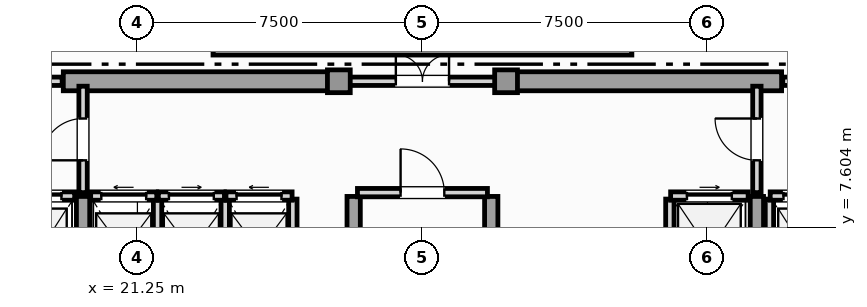
"""IFC4 building model, lengths in metres.
Left out: names, types, materials, properties, quantities, classifications, styles, units other than length and angle.
Written with IfcOpenShell. Run it as: python <this file> out.ifc"""

import sys

from ifc_helpers import new_model, si_unit, direction, frame, frame_2d, origin, origin_2d, place, context, subcontext, project, spatial, rectangle, extrude, element, fill, save


model = new_model("IFC4")
c1 = context("Model", 3, precision=1e-05, world=origin(), true_north=direction((0.0, 1.0)))
c2 = subcontext(c1, "Body", "Model", "MODEL_VIEW")
j1 = project(units=[si_unit("LENGTHUNIT", "METRE"), si_unit("PLANEANGLEUNIT", "RADIAN")], contexts=[c1])
p1 = place(None, origin())
s1 = spatial("IfcSite", under=j1, at=p1, CompositionType="ELEMENT")
p2 = place(p1, origin())
s2 = spatial("IfcBuilding", under=s1, at=p2, CompositionType="ELEMENT")
p3 = place(p2, frame((0.0, 0.0, 341.35)))
s3 = spatial("IfcBuildingStorey", under=s2, at=p3, CompositionType="ELEMENT", Elevation=341.35)
for number, where, z_axis, x_axis in (
    (1, (19.3, 11.45, 0.0), (0.0, 0.0, 1.0), (1.0, 0.0, 0.0)),
    (2, (30.9, 11.45, 0.0), (0.0, 0.0, 1.0), (1.0, 0.0, 0.0)),
):
    element("IfcWall", number, at=place(p3, frame(where, z_axis=z_axis, x_axis=x_axis)), inside=s3, PredefinedType="SHEAR", context=c2, shape_type="SweptSolid", body=[
        extrude(rectangle(XDim=7.3, YDim=0.5, at=frame_2d((3.65, 0.0))), origin(), (0.0, 0.0, 1.0), 3.63),
    ])
for number, where, z_axis, x_axis in (
    (3, (19.82, 0.92, 0.0), (0.0, 0.0, 1.0), (0.0, 1.0, 0.0)),
    (4, (26.94, 0.92, 0.0), (0.0, 0.0, 1.0), (0.0, 1.0, 0.0)),
    (5, (30.56, 0.92, 0.0), (0.0, 0.0, 1.0), (0.0, 1.0, 0.0)),
    (6, (37.55, 0.92, 0.0), (0.0, 0.0, 1.0), (0.0, 1.0, 0.0)),
):
    element("IfcWall", number, at=place(p3, frame(where, z_axis=z_axis, x_axis=x_axis)), inside=s3, PredefinedType="SHEAR", context=c2, shape_type="SweptSolid", body=[
        extrude(rectangle(XDim=7.5, YDim=0.35, at=frame_2d((3.75, 0.0))), origin(), (0.0, 0.0, 1.0), 3.63),
    ])
for number, where, z_axis, x_axis in (
    (7, (26.55, 11.45, 0.0), (0.0, 0.0, 1.0), (1.0, 0.0, 0.0)),
    (8, (30.95, 11.45, 0.0), (0.0, 0.0, 1.0), (1.0, 0.0, 0.0)),
):
    element("IfcColumn", number, at=place(p3, frame(where, z_axis=z_axis, x_axis=x_axis)), inside=s3, PredefinedType="COLUMN", context=c2, shape_type="SweptSolid", body=[
        extrude(rectangle(XDim=0.6, YDim=0.6, at=origin_2d()), origin(), (0.0, 0.0, 1.0), 3.85),
    ])
p4 = place(p3, frame((34.26, 12.27, 0.0), z_axis=(0.0, 0.0, 1.0), x_axis=(-1.0, 0.0, 0.0)))
e9 = element("IfcWall", 9, at=p4, inside=s3, PredefinedType="SOLIDWALL", context=c2, shape_type="SweptSolid", body=[
    extrude(rectangle(XDim=11.02, YDim=0.26, at=frame_2d((5.51, 0.0))), origin(), (0.0, 0.0, 1.0), 3.63),
])
p5 = place(p3, frame((17.78, 8.43, 0.0), z_axis=(0.0, 0.0, 1.0), x_axis=(1.0, 0.0, 0.0)))
e10 = element("IfcWall", 10, at=p5, inside=s3, PredefinedType="SOLIDWALL", context=c2, shape_type="SweptSolid", body=[
    extrude(rectangle(XDim=1.82, YDim=0.22, at=frame_2d((0.91, 0.0))), origin(), (0.0, 0.0, 1.0), 3.63),
])
p6 = place(p5, frame((0.35, 0.0, 0.0)))
e11 = element("IfcOpeningElement", 11, at=p6, cuts=e10, PredefinedType="OPENING", context=c2, shape_type="SweptSolid", body=[
    extrude(rectangle(XDim=1.12, YDim=2.25, at=frame_2d((0.56, 1.125))), frame((0.0, 0.12, 0.0), z_axis=(0.0, -1.0, 0.0), x_axis=(1.0, 0.0, 0.0)), (0.0, 0.0, 1.0), 0.24),
])
p7 = place(p3, frame((37.88, 5.65, 0.0), z_axis=(0.0, 0.0, 1.0), x_axis=(0.0, 1.0, 0.0)))
e12 = element("IfcWall", 12, at=p7, inside=s3, PredefinedType="SOLIDWALL", context=c2, shape_type="SweptSolid", body=[
    extrude(rectangle(XDim=2.7, YDim=0.22, at=frame_2d((1.35, 0.0))), origin(), (0.0, 0.0, 1.0), 3.63),
])
p8 = place(p3, frame((37.9, 8.43, 0.0), z_axis=(0.0, 0.0, 1.0), x_axis=(1.0, 0.0, 0.0)))
e13 = element("IfcWall", 13, at=p8, inside=s3, PredefinedType="SOLIDWALL", context=c2, shape_type="SweptSolid", body=[
    extrude(rectangle(XDim=1.82, YDim=0.22, at=frame_2d((0.91, 0.0))), origin(), (0.0, 0.0, 1.0), 3.63),
])
p9 = place(p8, frame((0.35, 0.0, 0.0)))
e14 = element("IfcOpeningElement", 14, at=p9, cuts=e13, PredefinedType="OPENING", context=c2, shape_type="SweptSolid", body=[
    extrude(rectangle(XDim=1.12, YDim=2.25, at=frame_2d((0.56, 1.125))), frame((0.0, 0.12, 0.0), z_axis=(0.0, -1.0, 0.0), x_axis=(1.0, 0.0, 0.0)), (0.0, 0.0, 1.0), 0.24),
])
p10 = place(p3, frame((35.26, 5.65, 0.0), z_axis=(0.0, 0.0, 1.0), x_axis=(0.0, 1.0, 0.0)))
e15 = element("IfcWall", 15, at=p10, inside=s3, PredefinedType="SOLIDWALL", context=c2, shape_type="SweptSolid", body=[
    extrude(rectangle(XDim=2.7, YDim=0.22, at=frame_2d((1.35, 0.0))), origin(), (0.0, 0.0, 1.0), 3.63),
])
p11 = place(p3, frame((35.28, 8.43, 0.0), z_axis=(0.0, 0.0, 1.0), x_axis=(1.0, 0.0, 0.0)))
e16 = element("IfcWall", 16, at=p11, inside=s3, PredefinedType="SOLIDWALL", context=c2, shape_type="SweptSolid", body=[
    extrude(rectangle(XDim=2.04, YDim=0.22, at=frame_2d((1.02, 0.0))), origin(), (0.0, 0.0, 1.0), 3.63),
])
p12 = place(p11, frame((0.43, 0.0, 0.0)))
e17 = element("IfcOpeningElement", 17, at=p12, cuts=e16, PredefinedType="OPENING", context=c2, shape_type="SweptSolid", body=[
    extrude(rectangle(XDim=1.18, YDim=2.2, at=frame_2d((0.59, 1.1))), frame((0.0, 0.12, 0.0), z_axis=(0.0, -1.0, 0.0), x_axis=(1.0, 0.0, 0.0)), (0.0, 0.0, 1.0), 0.24),
])
p13 = place(p3, frame((21.78, 5.65, 0.0), z_axis=(0.0, 0.0, 1.0), x_axis=(0.0, 1.0, 0.0)))
e18 = element("IfcWall", 18, at=p13, inside=s3, PredefinedType="SOLIDWALL", context=c2, shape_type="SweptSolid", body=[
    extrude(rectangle(XDim=2.7, YDim=0.22, at=frame_2d((1.35, 0.0))), origin(), (0.0, 0.0, 1.0), 3.63),
])
p14 = place(p3, frame((20.02, 8.43, 0.0), z_axis=(0.0, 0.0, 1.0), x_axis=(1.0, 0.0, 0.0)))
e19 = element("IfcWall", 19, at=p14, inside=s3, PredefinedType="SOLIDWALL", context=c2, shape_type="SweptSolid", body=[
    extrude(rectangle(XDim=1.74, YDim=0.22, at=frame_2d((0.87, 0.0))), origin(), (0.0, 0.0, 1.0), 3.63),
])
p15 = place(p14, frame((0.28, 0.0, 0.0)))
e20 = element("IfcOpeningElement", 20, at=p15, cuts=e19, PredefinedType="OPENING", context=c2, shape_type="SweptSolid", body=[
    extrude(rectangle(XDim=1.18, YDim=2.2, at=frame_2d((0.59, 1.1))), frame((0.0, 0.12, 0.0), z_axis=(0.0, -1.0, 0.0), x_axis=(1.0, 0.0, 0.0)), (0.0, 0.0, 1.0), 0.24),
])
p16 = place(p3, frame((23.56, 5.65, 0.0), z_axis=(0.0, 0.0, 1.0), x_axis=(0.0, 1.0, 0.0)))
e21 = element("IfcWall", 21, at=p16, inside=s3, PredefinedType="SOLIDWALL", context=c2, shape_type="SweptSolid", body=[
    extrude(rectangle(XDim=2.7, YDim=0.22, at=frame_2d((1.35, 0.0))), origin(), (0.0, 0.0, 1.0), 3.63),
])
p17 = place(p3, frame((21.8, 8.43, 0.0), z_axis=(0.0, 0.0, 1.0), x_axis=(1.0, 0.0, 0.0)))
e22 = element("IfcWall", 22, at=p17, inside=s3, PredefinedType="SOLIDWALL", context=c2, shape_type="SweptSolid", body=[
    extrude(rectangle(XDim=1.74, YDim=0.22, at=frame_2d((0.87, 0.0))), origin(), (0.0, 0.0, 1.0), 3.63),
])
p18 = place(p17, frame((0.28, 0.0, 0.0)))
e23 = element("IfcOpeningElement", 23, at=p18, cuts=e22, PredefinedType="OPENING", context=c2, shape_type="SweptSolid", body=[
    extrude(rectangle(XDim=1.18, YDim=2.2, at=frame_2d((0.59, 1.1))), frame((0.0, 0.12, 0.0), z_axis=(0.0, -1.0, 0.0), x_axis=(1.0, 0.0, 0.0)), (0.0, 0.0, 1.0), 0.24),
])
p19 = place(p3, frame((25.34, 5.65, 0.0), z_axis=(0.0, 0.0, 1.0), x_axis=(0.0, 1.0, 0.0)))
e24 = element("IfcWall", 24, at=p19, inside=s3, PredefinedType="SOLIDWALL", context=c2, shape_type="SweptSolid", body=[
    extrude(rectangle(XDim=2.7, YDim=0.22, at=frame_2d((1.35, 0.0))), origin(), (0.0, 0.0, 1.0), 3.63),
])
p20 = place(p3, frame((23.58, 8.43, 0.0), z_axis=(0.0, 0.0, 1.0), x_axis=(1.0, 0.0, 0.0)))
e25 = element("IfcWall", 25, at=p20, inside=s3, PredefinedType="SOLIDWALL", context=c2, shape_type="SweptSolid", body=[
    extrude(rectangle(XDim=1.74, YDim=0.22, at=frame_2d((0.87, 0.0))), origin(), (0.0, 0.0, 1.0), 3.63),
])
p21 = place(p20, frame((0.28, 0.0, 0.0)))
e26 = element("IfcOpeningElement", 26, at=p21, cuts=e25, PredefinedType="OPENING", context=c2, shape_type="SweptSolid", body=[
    extrude(rectangle(XDim=1.18, YDim=2.2, at=frame_2d((0.59, 1.1))), frame((0.0, 0.12, 0.0), z_axis=(0.0, -1.0, 0.0), x_axis=(1.0, 0.0, 0.0)), (0.0, 0.0, 1.0), 0.24),
])
p22 = place(p3, frame((27.04, 8.52, 0.0), z_axis=(0.0, 0.0, 1.0), x_axis=(1.0, 0.0, 0.0)))
e27 = element("IfcWall", 27, at=p22, inside=s3, PredefinedType="SOLIDWALL", context=c2, shape_type="SweptSolid", body=[
    extrude(rectangle(XDim=3.42, YDim=0.22, at=frame_2d((1.71, 0.0))), origin(), (0.0, 0.0, 1.0), 3.63),
])
p23 = place(p22, frame((1.135, 0.0, 0.0)))
e28 = element("IfcOpeningElement", 28, at=p23, cuts=e27, PredefinedType="OPENING", context=c2, shape_type="SweptSolid", body=[
    extrude(rectangle(XDim=1.15, YDim=2.2, at=frame_2d((0.575, 1.1))), frame((0.0, 0.12, 0.0), z_axis=(0.0, -1.0, 0.0), x_axis=(1.0, 0.0, 0.0)), (0.0, 0.0, 1.0), 0.24),
])
p24 = place(p3, frame((19.82, 8.52, 0.0), z_axis=(0.0, 0.0, 1.0), x_axis=(0.0, 1.0, 0.0)))
e29 = element("IfcWall", 29, at=p24, inside=s3, PredefinedType="SOLIDWALL", context=c2, shape_type="SweptSolid", body=[
    extrude(rectangle(XDim=2.8, YDim=0.22, at=frame_2d((1.4, 0.0))), origin(), (0.0, 0.0, 1.0), 3.085),
])
p25 = place(p24, frame((0.85, 0.0, 0.0)))
e30 = element("IfcOpeningElement", 30, at=p25, cuts=e29, PredefinedType="OPENING", context=c2, shape_type="SweptSolid", body=[
    extrude(rectangle(XDim=1.1, YDim=2.2, at=frame_2d((0.55, 1.1))), frame((0.0, 0.12, 0.0), z_axis=(0.0, -1.0, 0.0), x_axis=(1.0, 0.0, 0.0)), (0.0, 0.0, 1.0), 0.24),
])
p26 = place(p3, frame((37.55, 8.52, 0.0), z_axis=(0.0, 0.0, 1.0), x_axis=(0.0, 1.0, 0.0)))
e31 = element("IfcWall", 31, at=p26, inside=s3, PredefinedType="SOLIDWALL", context=c2, shape_type="SweptSolid", body=[
    extrude(rectangle(XDim=2.8, YDim=0.22, at=frame_2d((1.4, 0.0))), origin(), (0.0, 0.0, 1.0), 3.085),
])
p27 = place(p26, frame((0.85, 0.0, 0.0)))
e32 = element("IfcOpeningElement", 32, at=p27, cuts=e31, PredefinedType="OPENING", context=c2, shape_type="SweptSolid", body=[
    extrude(rectangle(XDim=1.1, YDim=2.2, at=frame_2d((0.55, 1.1))), frame((0.0, 0.12, 0.0), z_axis=(0.0, -1.0, 0.0), x_axis=(1.0, 0.0, 0.0)), (0.0, 0.0, 1.0), 0.24),
])
p28 = place(p3, frame((16.23, 11.45, 0.0), z_axis=(0.0, 0.0, 1.0), x_axis=(1.0, 0.0, 0.0)))
e33 = element("IfcWall", 33, at=p28, inside=s3, PredefinedType="SOLIDWALL", context=c2, shape_type="SweptSolid", body=[
    extrude(rectangle(XDim=3.04, YDim=0.22, at=frame_2d((1.52, 0.0))), origin(), (0.0, 0.0, 1.0), 3.63),
])
p29 = place(p28, frame((0.97, 0.0, 0.0)))
e34 = element("IfcOpeningElement", 34, at=p29, cuts=e33, PredefinedType="OPENING", context=c2, shape_type="SweptSolid", body=[
    extrude(rectangle(XDim=1.1, YDim=2.2, at=frame_2d((0.55, 1.1))), frame((0.0, 0.12, 0.0), z_axis=(0.0, -1.0, 0.0), x_axis=(1.0, 0.0, 0.0)), (0.0, 0.0, 1.0), 0.24),
])
p30 = place(p3, frame((26.63, 11.45, 0.0), z_axis=(0.0, 0.0, 1.0), x_axis=(1.0, 0.0, 0.0)))
e35 = element("IfcWall", 35, at=p30, inside=s3, PredefinedType="SOLIDWALL", context=c2, shape_type="SweptSolid", body=[
    extrude(rectangle(XDim=4.24, YDim=0.22, at=frame_2d((2.12, 0.0))), origin(), (0.0, 0.0, 1.0), 3.63),
])
p31 = place(p30, frame((1.42, 0.0, 0.0)))
e36 = element("IfcOpeningElement", 36, at=p31, cuts=e35, PredefinedType="OPENING", context=c2, shape_type="SweptSolid", body=[
    extrude(rectangle(XDim=1.4, YDim=2.2, at=frame_2d((0.7, 1.1))), frame((0.0, 0.12, 0.0), z_axis=(0.0, -1.0, 0.0), x_axis=(1.0, 0.0, 0.0)), (0.0, 0.0, 1.0), 0.24),
])
p32 = place(p3, frame((38.23, 11.45, 0.0), z_axis=(0.0, 0.0, 1.0), x_axis=(1.0, 0.0, 0.0)))
e37 = element("IfcWall", 37, at=p32, inside=s3, PredefinedType="SOLIDWALL", context=c2, shape_type="SweptSolid", body=[
    extrude(rectangle(XDim=3.04, YDim=0.22, at=frame_2d((1.52, 0.0))), origin(), (0.0, 0.0, 1.0), 3.63),
])
p33 = place(p32, frame((0.97, 0.0, 0.0)))
e38 = element("IfcOpeningElement", 38, at=p33, cuts=e37, PredefinedType="OPENING", context=c2, shape_type="SweptSolid", body=[
    extrude(rectangle(XDim=1.1, YDim=2.2, at=frame_2d((0.55, 1.1))), frame((0.0, 0.12, 0.0), z_axis=(0.0, -1.0, 0.0), x_axis=(1.0, 0.0, 0.0)), (0.0, 0.0, 1.0), 0.24),
])
p34 = place(p6, origin())
e39 = element("IfcDoor", 39, at=p34, inside=s3, OperationType="SLIDING_TO_RIGHT", PredefinedType="DOOR", context=c2, shape_type="SweptSolid", body=[
    extrude(rectangle(XDim=1.12, YDim=2.25, at=frame_2d((0.56, 1.125))), frame((0.0, 0.025, 0.0), z_axis=(0.0, -1.0, 0.0), x_axis=(1.0, 0.0, 0.0)), (0.0, 0.0, 1.0), 0.05),
])
fill(e11, e39)
p35 = place(p9, origin())
e40 = element("IfcDoor", 40, at=p35, inside=s3, OperationType="SLIDING_TO_LEFT", PredefinedType="DOOR", context=c2, shape_type="SweptSolid", body=[
    extrude(rectangle(XDim=1.12, YDim=2.25, at=frame_2d((0.56, 1.125))), frame((0.0, 0.025, 0.0), z_axis=(0.0, -1.0, 0.0), x_axis=(1.0, 0.0, 0.0)), (0.0, 0.0, 1.0), 0.05),
])
fill(e14, e40)
p36 = place(p12, origin())
e41 = element("IfcDoor", 41, at=p36, inside=s3, OperationType="SLIDING_TO_RIGHT", PredefinedType="DOOR", context=c2, shape_type="SweptSolid", body=[
    extrude(rectangle(XDim=1.18, YDim=2.2, at=frame_2d((0.59, 1.1))), frame((0.0, 0.025, 0.0), z_axis=(0.0, -1.0, 0.0), x_axis=(1.0, 0.0, 0.0)), (0.0, 0.0, 1.0), 0.05),
])
fill(e17, e41)
p37 = place(p15, origin())
e42 = element("IfcDoor", 42, at=p37, inside=s3, OperationType="SLIDING_TO_LEFT", PredefinedType="DOOR", context=c2, shape_type="SweptSolid", body=[
    extrude(rectangle(XDim=1.18, YDim=2.2, at=frame_2d((0.59, 1.1))), frame((0.0, 0.025, 0.0), z_axis=(0.0, -1.0, 0.0), x_axis=(1.0, 0.0, 0.0)), (0.0, 0.0, 1.0), 0.05),
])
fill(e20, e42)
p38 = place(p18, origin())
e43 = element("IfcDoor", 43, at=p38, inside=s3, OperationType="SLIDING_TO_RIGHT", PredefinedType="DOOR", context=c2, shape_type="SweptSolid", body=[
    extrude(rectangle(XDim=1.18, YDim=2.2, at=frame_2d((0.59, 1.1))), frame((0.0, 0.025, 0.0), z_axis=(0.0, -1.0, 0.0), x_axis=(1.0, 0.0, 0.0)), (0.0, 0.0, 1.0), 0.05),
])
fill(e23, e43)
p39 = place(p21, origin())
e44 = element("IfcDoor", 44, at=p39, inside=s3, OperationType="SLIDING_TO_LEFT", PredefinedType="DOOR", context=c2, shape_type="SweptSolid", body=[
    extrude(rectangle(XDim=1.18, YDim=2.2, at=frame_2d((0.59, 1.1))), frame((0.0, 0.025, 0.0), z_axis=(0.0, -1.0, 0.0), x_axis=(1.0, 0.0, 0.0)), (0.0, 0.0, 1.0), 0.05),
])
fill(e26, e44)
p40 = place(p23, origin())
e45 = element("IfcDoor", 45, at=p40, inside=s3, OperationType="SINGLE_SWING_LEFT", PredefinedType="DOOR", context=c2, shape_type="SweptSolid", body=[
    extrude(rectangle(XDim=1.15, YDim=2.2, at=frame_2d((0.575, 1.1))), frame((0.0, 0.025, 0.0), z_axis=(0.0, -1.0, 0.0), x_axis=(1.0, 0.0, 0.0)), (0.0, 0.0, 1.0), 0.05),
])
fill(e28, e45)
p41 = place(p25, origin())
e46 = element("IfcDoor", 46, at=p41, inside=s3, OperationType="SINGLE_SWING_LEFT", PredefinedType="DOOR", context=c2, shape_type="SweptSolid", body=[
    extrude(rectangle(XDim=1.1, YDim=2.2, at=frame_2d((0.55, 1.1))), frame((0.0, 0.025, 0.0), z_axis=(0.0, -1.0, 0.0), x_axis=(1.0, 0.0, 0.0)), (0.0, 0.0, 1.0), 0.05),
])
fill(e30, e46)
p42 = place(p27, origin())
e47 = element("IfcDoor", 47, at=p42, inside=s3, OperationType="SINGLE_SWING_RIGHT", PredefinedType="DOOR", context=c2, shape_type="SweptSolid", body=[
    extrude(rectangle(XDim=1.1, YDim=2.2, at=frame_2d((0.55, 1.1))), frame((0.0, 0.025, 0.0), z_axis=(0.0, -1.0, 0.0), x_axis=(1.0, 0.0, 0.0)), (0.0, 0.0, 1.0), 0.05),
])
fill(e32, e47)
p43 = place(p31, origin())
e48 = element("IfcDoor", 48, at=p43, inside=s3, OperationType="DOUBLE_DOOR_SINGLE_SWING", PredefinedType="DOOR", context=c2, shape_type="SweptSolid", body=[
    extrude(rectangle(XDim=1.4, YDim=2.2, at=frame_2d((0.7, 1.1))), frame((0.0, 0.025, 0.0), z_axis=(0.0, -1.0, 0.0), x_axis=(1.0, 0.0, 0.0)), (0.0, 0.0, 1.0), 0.05),
])
fill(e36, e48)
save(model, sys.argv[1])
